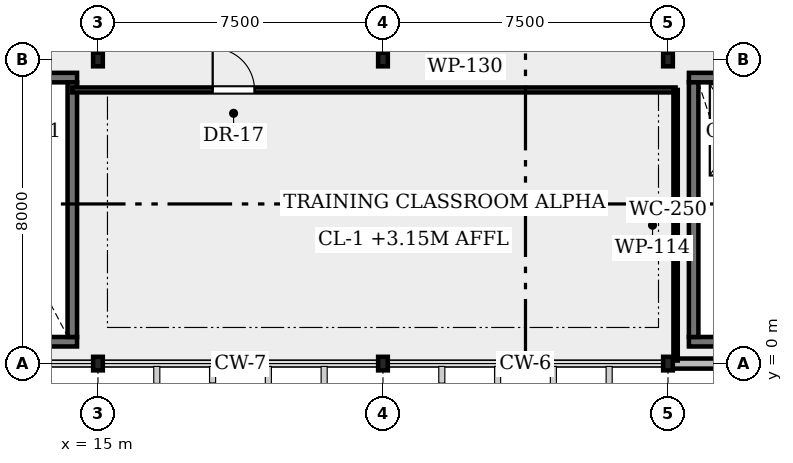
"""IFC4 building model, lengths in metres.
Left out: names, types, materials, properties, quantities, classifications, styles, units other than length and angle.
Written with IfcOpenShell. Run it as: python <this file> out.ifc"""

import sys

from ifc_helpers import new_model, si_unit, direction, frame, frame_2d, origin, origin_2d, place, context, subcontext, project, spatial, rectangle, i_section, extrude, element, fill, save


model = new_model("IFC4")
c1 = context("Model", 3, precision=1e-05, world=origin(), true_north=direction((0.0, 1.0)))
c2 = subcontext(c1, "Body", "Model", "MODEL_VIEW")
j1 = project(units=[si_unit("LENGTHUNIT", "METRE"), si_unit("PLANEANGLEUNIT", "RADIAN")], contexts=[c1])
p1 = place(None, origin())
s1 = spatial("IfcSite", under=j1, at=p1, CompositionType="ELEMENT")
p2 = place(p1, origin())
s2 = spatial("IfcBuilding", under=s1, at=p2, CompositionType="ELEMENT")
p3 = place(p2, frame((0.0, 0.0, 9.0)))
s3 = spatial("IfcBuildingStorey", under=s2, at=p3, CompositionType="ELEMENT", Elevation=9.0)
p4 = place(p3, frame((15.0, 0.0, 0.0), z_axis=(0.0, 0.0, 1.0), x_axis=(1.0, 0.0, 0.0)))
e1 = element("IfcColumn", 1, at=p4, inside=s3, PredefinedType="COLUMN", context=c2, shape_type="SweptSolid", body=[
    extrude(i_section(OverallWidth=0.255, OverallDepth=0.357, WebThickness=0.01, FlangeThickness=0.018, FilletRadius=0.015, at=origin_2d()), origin(), (0.0, 0.0, 1.0), 4.46),
])
p5 = place(p3, frame((15.0, 8.0, 0.0), z_axis=(0.0, 0.0, 1.0), x_axis=(1.0, 0.0, 0.0)))
e2 = element("IfcColumn", 2, at=p5, inside=s3, PredefinedType="COLUMN", context=c2, shape_type="SweptSolid", body=[
    extrude(i_section(OverallWidth=0.255, OverallDepth=0.357, WebThickness=0.01, FlangeThickness=0.018, FilletRadius=0.015, at=origin_2d()), origin(), (0.0, 0.0, 1.0), 4.927),
])
p6 = place(p3, frame((22.5, 0.0, 0.0), z_axis=(0.0, 0.0, 1.0), x_axis=(1.0, 0.0, 0.0)))
e3 = element("IfcColumn", 3, at=p6, inside=s3, PredefinedType="COLUMN", context=c2, shape_type="SweptSolid", body=[
    extrude(i_section(OverallWidth=0.255, OverallDepth=0.357, WebThickness=0.01, FlangeThickness=0.018, FilletRadius=0.015, at=origin_2d()), origin(), (0.0, 0.0, 1.0), 4.46),
])
p7 = place(p3, frame((22.5, 8.0, 0.0), z_axis=(0.0, 0.0, 1.0), x_axis=(1.0, 0.0, 0.0)))
e4 = element("IfcColumn", 4, at=p7, inside=s3, PredefinedType="COLUMN", context=c2, shape_type="SweptSolid", body=[
    extrude(i_section(OverallWidth=0.255, OverallDepth=0.357, WebThickness=0.01, FlangeThickness=0.018, FilletRadius=0.015, at=origin_2d()), origin(), (0.0, 0.0, 1.0), 4.927),
])
p8 = place(p3, frame((30.0, 0.0, 0.0), z_axis=(0.0, 0.0, 1.0), x_axis=(1.0, 0.0, 0.0)))
e5 = element("IfcColumn", 5, at=p8, inside=s3, PredefinedType="COLUMN", context=c2, shape_type="SweptSolid", body=[
    extrude(i_section(OverallWidth=0.255, OverallDepth=0.357, WebThickness=0.01, FlangeThickness=0.018, FilletRadius=0.015, at=origin_2d()), origin(), (0.0, 0.0, 1.0), 4.46),
])
p9 = place(p3, frame((30.0, 8.0, 0.0), z_axis=(0.0, 0.0, 1.0), x_axis=(1.0, 0.0, 0.0)))
e6 = element("IfcColumn", 6, at=p9, inside=s3, PredefinedType="COLUMN", context=c2, shape_type="SweptSolid", body=[
    extrude(i_section(OverallWidth=0.255, OverallDepth=0.357, WebThickness=0.01, FlangeThickness=0.018, FilletRadius=0.015, at=origin_2d()), origin(), (0.0, 0.0, 1.0), 4.927),
])
p10 = place(p3, frame((30.08, 0.0, 0.0), z_axis=(0.0, 0.0, 1.0), x_axis=(1.0, 0.0, 0.0)))
e7 = element("IfcWall", 7, at=p10, inside=s3, PredefinedType="SOLIDWALL", context=c2, shape_type="SweptSolid", body=[
    extrude(rectangle(XDim=7.34, YDim=0.265, at=frame_2d((3.67, 0.0))), origin(), (0.0, 0.0, 1.0), 4.087),
])
p11 = place(p10, frame((1.2, 0.0, 1.05)))
e8 = element("IfcOpeningElement", 8, at=p11, cuts=e7, PredefinedType="OPENING", context=c2, shape_type="SweptSolid", body=[
    extrude(rectangle(XDim=1.8, YDim=1.1, at=frame_2d((0.9, 0.55))), frame((0.0, 0.142, 0.0), z_axis=(0.0, -1.0, 0.0), x_axis=(1.0, 0.0, 0.0)), (0.0, 0.0, 1.0), 0.285),
])
p12 = place(p10, frame((4.1, 0.0, 1.05)))
e9 = element("IfcOpeningElement", 9, at=p12, cuts=e7, PredefinedType="OPENING", context=c2, shape_type="SweptSolid", body=[
    extrude(rectangle(XDim=1.8, YDim=1.25, at=frame_2d((0.9, 0.625))), frame((0.0, 0.142, 0.0), z_axis=(0.0, -1.0, 0.0), x_axis=(1.0, 0.0, 0.0)), (0.0, 0.0, 1.0), 0.285),
])
p13 = place(p3, frame((8.05, 0.575, 0.0), z_axis=(0.0, 0.0, 1.0), x_axis=(1.0, 0.0, 0.0)))
e10 = element("IfcWall", 10, at=p13, inside=s3, PredefinedType="SHEAR", context=c2, shape_type="SweptSolid", body=[
    extrude(rectangle(XDim=6.4, YDim=0.25, at=frame_2d((3.2, 0.0))), origin(), (0.0, 0.0, 1.0), 3.65),
])
p14 = place(p3, frame((8.05, 7.525, 0.0), z_axis=(0.0, 0.0, 1.0), x_axis=(1.0, 0.0, 0.0)))
e11 = element("IfcWall", 11, at=p14, inside=s3, PredefinedType="SHEAR", context=c2, shape_type="SweptSolid", body=[
    extrude(rectangle(XDim=6.4, YDim=0.25, at=frame_2d((3.2, 0.0))), origin(), (0.0, 0.0, 1.0), 3.65),
])
p15 = place(p14, frame((0.8, 0.0, 0.0)))
e12 = element("IfcOpeningElement", 12, at=p15, cuts=e11, PredefinedType="OPENING", context=c2, shape_type="SweptSolid", body=[
    extrude(rectangle(XDim=1.1, YDim=2.15, at=frame_2d((0.55, 1.075))), frame((0.0, 0.135, 0.0), z_axis=(0.0, -1.0, 0.0), x_axis=(1.0, 0.0, 0.0)), (0.0, 0.0, 1.0), 0.27),
])
p16 = place(p14, frame((3.775, 0.0, 0.0)))
e13 = element("IfcOpeningElement", 13, at=p16, cuts=e11, PredefinedType="OPENING", context=c2, shape_type="SweptSolid", body=[
    extrude(rectangle(XDim=1.25, YDim=2.15, at=frame_2d((0.625, 1.075))), frame((0.0, 0.135, 0.0), z_axis=(0.0, -1.0, 0.0), x_axis=(1.0, 0.0, 0.0)), (0.0, 0.0, 1.0), 0.27),
])
p17 = place(p3, frame((14.325, 0.7, 0.0), z_axis=(0.0, 0.0, 1.0), x_axis=(0.0, 1.0, 0.0)))
e14 = element("IfcWall", 14, at=p17, inside=s3, PredefinedType="SHEAR", context=c2, shape_type="SweptSolid", body=[
    extrude(rectangle(XDim=6.7, YDim=0.25, at=frame_2d((3.35, 0.0))), origin(), (0.0, 0.0, 1.0), 3.65),
])
p18 = place(p3, frame((30.55, 0.575, 0.0), z_axis=(0.0, 0.0, 1.0), x_axis=(1.0, 0.0, 0.0)))
e15 = element("IfcWall", 15, at=p18, inside=s3, PredefinedType="SHEAR", context=c2, shape_type="SweptSolid", body=[
    extrude(rectangle(XDim=6.4, YDim=0.25, at=frame_2d((3.2, 0.0))), origin(), (0.0, 0.0, 1.0), 3.65),
])
p19 = place(p3, frame((30.55, 7.525, 0.0), z_axis=(0.0, 0.0, 1.0), x_axis=(1.0, 0.0, 0.0)))
e16 = element("IfcWall", 16, at=p19, inside=s3, PredefinedType="SHEAR", context=c2, shape_type="SweptSolid", body=[
    extrude(rectangle(XDim=6.4, YDim=0.25, at=frame_2d((3.2, 0.0))), origin(), (0.0, 0.0, 1.0), 3.65),
])
p20 = place(p19, frame((0.8, 0.0, 0.0)))
e17 = element("IfcOpeningElement", 17, at=p20, cuts=e16, PredefinedType="OPENING", context=c2, shape_type="SweptSolid", body=[
    extrude(rectangle(XDim=1.1, YDim=2.15, at=frame_2d((0.55, 1.075))), frame((0.0, 0.135, 0.0), z_axis=(0.0, -1.0, 0.0), x_axis=(1.0, 0.0, 0.0)), (0.0, 0.0, 1.0), 0.27),
])
p21 = place(p19, frame((3.775, 0.0, 0.0)))
e18 = element("IfcOpeningElement", 18, at=p21, cuts=e16, PredefinedType="OPENING", context=c2, shape_type="SweptSolid", body=[
    extrude(rectangle(XDim=1.25, YDim=2.15, at=frame_2d((0.625, 1.075))), frame((0.0, 0.135, 0.0), z_axis=(0.0, -1.0, 0.0), x_axis=(1.0, 0.0, 0.0)), (0.0, 0.0, 1.0), 0.27),
])
p22 = place(p3, frame((30.675, 0.7, 0.0), z_axis=(0.0, 0.0, 1.0), x_axis=(0.0, 1.0, 0.0)))
e19 = element("IfcWall", 19, at=p22, inside=s3, PredefinedType="SHEAR", context=c2, shape_type="SweptSolid", body=[
    extrude(rectangle(XDim=6.7, YDim=0.25, at=frame_2d((3.35, 0.0))), origin(), (0.0, 0.0, 1.0), 3.65),
])
p23 = place(p3, frame((14.325, 7.2, 0.0), z_axis=(0.0, 0.0, 1.0), x_axis=(1.0, 0.0, 0.0)))
e20 = element("IfcWall", 20, at=p23, inside=s3, PredefinedType="PARTITIONING", context=c2, shape_type="SweptSolid", body=[
    extrude(rectangle(XDim=15.875, YDim=0.13, at=frame_2d((7.938, 0.0))), origin(), (0.0, 0.0, 1.0), 3.7),
])
p24 = place(p23, frame((3.694, 0.0, 0.0)))
e21 = element("IfcOpeningElement", 21, at=p24, cuts=e20, PredefinedType="OPENING", context=c2, shape_type="SweptSolid", body=[
    extrude(rectangle(XDim=1.1, YDim=2.18, at=frame_2d((0.55, 1.09))), frame((0.0, 0.075, 0.0), z_axis=(0.0, -1.0, 0.0), x_axis=(1.0, 0.0, 0.0)), (0.0, 0.0, 1.0), 0.15),
])
p25 = place(p3, frame((30.2, 0.08, 0.0), z_axis=(0.0, 0.0, 1.0), x_axis=(0.0, 1.0, 0.0)))
e22 = element("IfcWall", 22, at=p25, inside=s3, PredefinedType="PARTITIONING", context=c2, shape_type="SweptSolid", body=[
    extrude(rectangle(XDim=7.12, YDim=0.114, at=frame_2d((3.56, 0.0))), origin(), (0.0, 0.0, 1.0), 3.7),
])
p26 = place(p24, origin())
e23 = element("IfcDoor", 23, at=p26, inside=s3, OperationType="SINGLE_SWING_LEFT", PredefinedType="DOOR", context=c2, shape_type="SweptSolid", body=[
    extrude(rectangle(XDim=1.1, YDim=2.18, at=frame_2d((0.55, 1.09))), frame((0.0, 0.025, 0.0), z_axis=(0.0, -1.0, 0.0), x_axis=(1.0, 0.0, 0.0)), (0.0, 0.0, 1.0), 0.05),
])
fill(e21, e23)
save(model, sys.argv[1])
